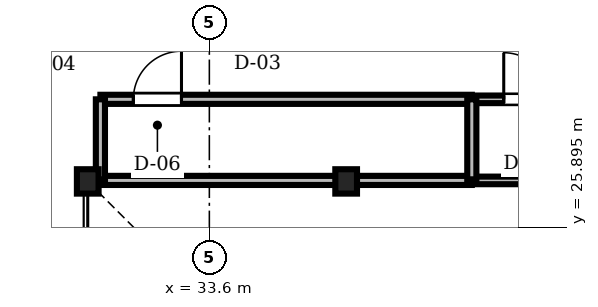
"""IFC4 building model, lengths in metres.
Left out: names, types, materials, properties, quantities, classifications, styles, units other than length and angle.
Written with IfcOpenShell. Run it as: python <this file> out.ifc"""

import sys

from ifc_helpers import new_model, si_unit, direction, frame, frame_2d, origin, origin_2d, place, context, subcontext, project, spatial, rectangle, i_section, extrude, source, transform, mapped, element, fill, save


model = new_model("IFC4")
c1 = context("Model", 3, precision=1e-05, world=origin(), true_north=direction((0.0, 1.0)))
c2 = subcontext(c1, "Body", "Model", "MODEL_VIEW")
j1 = project(units=[si_unit("LENGTHUNIT", "METRE"), si_unit("PLANEANGLEUNIT", "RADIAN")], contexts=[c1])
p1 = place(None, origin())
s1 = spatial("IfcSite", under=j1, at=p1, CompositionType="ELEMENT")
p2 = place(p1, origin())
s2 = spatial("IfcBuilding", under=s1, at=p2, CompositionType="ELEMENT")
p3 = place(p2, frame((0.0, 0.0, 60.45)))
s3 = spatial("IfcBuildingStorey", under=s2, at=p3, CompositionType="ELEMENT", Elevation=60.45)
m1 = source(origin(), c2, "Body", "SweptSolid", [
    extrude(i_section(OverallWidth=0.428, OverallDepth=0.481, WebThickness=0.04, FlangeThickness=0.063, FilletRadius=0.015, at=origin_2d()), origin(), (0.0, 0.0, 1.0), 3.41),
])
for number, where, z_axis, x_axis in (
    (1, (36.3, 26.8, 0.0), (0.0, 0.0, 1.0), (1.0, 0.0, 0.0)),
    (2, (31.2, 26.8, 0.0), (0.0, 0.0, 1.0), (1.0, 0.0, 0.0)),
):
    element("IfcColumn", number, at=place(p3, frame(where, z_axis=z_axis, x_axis=x_axis)), inside=s3, PredefinedType="COLUMN", context=c2, shape_type="MappedRepresentation", body=[
        mapped(m1, transform((0.0, 0.0, 0.0), scale=1.0)),
    ])
m2 = source(origin(), c2, "Body", "SweptSolid", [
    extrude(rectangle(XDim=7.33, YDim=0.18, at=frame_2d((3.665, 0.0))), origin(), (0.0, 0.0, 1.0), 3.042),
])
p4 = place(p3, frame((31.45, 28.42, 0.0), z_axis=(0.0, 0.0, 1.0), x_axis=(1.0, 0.0, 0.0)))
e3 = element("IfcWall", 3, at=p4, inside=s3, PredefinedType="PARTITIONING", context=c2, shape_type="MappedRepresentation", body=[
    mapped(m2, transform((0.0, 0.0, 0.0), scale=1.0)),
])
m3 = source(origin(), c2, "Body", "SweptSolid", [
    extrude(rectangle(XDim=0.95, YDim=2.15, at=frame_2d((0.475, 1.075))), frame((0.0, 0.1, 0.0), z_axis=(0.0, -1.0, 0.0), x_axis=(1.0, 0.0, 0.0)), (0.0, 0.0, 1.0), 0.2),
])
p5 = place(p4, frame((0.65, 0.0, 0.0)))
e4 = element("IfcOpeningElement", 4, at=p5, cuts=e3, PredefinedType="OPENING", context=c2, shape_type="MappedRepresentation", body=[
    mapped(m3, transform((0.0, 0.0, 0.0), scale=1.0)),
])
m4 = source(origin(), c2, "Body", "SweptSolid", [
    extrude(rectangle(XDim=2.74, YDim=0.15, at=frame_2d((1.37, 0.0))), origin(), (0.0, 0.0, 1.0), 3.41),
])
p6 = place(p3, frame((38.78, 28.42, 0.0), z_axis=(0.0, 0.0, 1.0), x_axis=(1.0, 0.0, 0.0)))
e5 = element("IfcWall", 5, at=p6, inside=s3, PredefinedType="PARTITIONING", context=c2, shape_type="MappedRepresentation", body=[
    mapped(m4, transform((0.0, 0.0, 0.0), scale=1.0)),
])
m5 = source(origin(), c2, "Body", "SweptSolid", [
    extrude(rectangle(XDim=0.92, YDim=2.1, at=frame_2d((0.46, 1.05))), frame((0.0, 0.085, 0.0), z_axis=(0.0, -1.0, 0.0), x_axis=(1.0, 0.0, 0.0)), (0.0, 0.0, 1.0), 0.17),
])
p7 = place(p6, frame((0.63, 0.0, 0.0)))
e6 = element("IfcOpeningElement", 6, at=p7, cuts=e5, PredefinedType="OPENING", context=c2, shape_type="MappedRepresentation", body=[
    mapped(m5, transform((0.0, 0.0, 0.0), scale=1.0)),
])
m6 = source(origin(), c2, "Body", "SweptSolid", [
    extrude(rectangle(XDim=7.33, YDim=0.18, at=frame_2d((3.665, 0.0))), origin(), (0.0, 0.0, 1.0), 2.952),
])
p8 = place(p3, frame((31.45, 26.82, 0.0), z_axis=(0.0, 0.0, 1.0), x_axis=(1.0, 0.0, 0.0)))
e7 = element("IfcWall", 7, at=p8, inside=s3, PredefinedType="PARTITIONING", context=c2, shape_type="MappedRepresentation", body=[
    mapped(m6, transform((0.0, 0.0, 0.0), scale=1.0)),
])
m7 = source(origin(), c2, "Body", "SweptSolid", [
    extrude(rectangle(XDim=2.74, YDim=0.15, at=frame_2d((1.37, 0.0))), origin(), (0.0, 0.0, 1.0), 2.802),
])
p9 = place(p3, frame((38.78, 26.82, 0.0), z_axis=(0.0, 0.0, 1.0), x_axis=(1.0, 0.0, 0.0)))
e8 = element("IfcWall", 8, at=p9, inside=s3, PredefinedType="PARTITIONING", context=c2, shape_type="MappedRepresentation", body=[
    mapped(m7, transform((0.0, 0.0, 0.0), scale=1.0)),
])
m8 = source(origin(), c2, "Body", "SweptSolid", [
    extrude(rectangle(XDim=1.6, YDim=0.18, at=frame_2d((0.8, 0.0))), origin(), (0.0, 0.0, 1.0), 2.952),
])
for number, where, z_axis, x_axis in (
    (9, (31.45, 26.82, 0.0), (0.0, 0.0, 1.0), (0.0, 1.0, 0.0)),
    (10, (38.78, 26.82, 0.0), (0.0, 0.0, 1.0), (0.0, 1.0, 0.0)),
):
    element("IfcWall", number, at=place(p3, frame(where, z_axis=z_axis, x_axis=x_axis)), inside=s3, PredefinedType="PARTITIONING", context=c2, shape_type="MappedRepresentation", body=[
        mapped(m8, transform((0.0, 0.0, 0.0), scale=1.0)),
    ])
m9 = source(origin(), c2, "Body", "SweptSolid", [
    extrude(rectangle(XDim=0.95, YDim=2.15, at=frame_2d((0.475, 1.075))), frame((0.0, 0.025, 0.0), z_axis=(0.0, -1.0, 0.0), x_axis=(1.0, 0.0, 0.0)), (0.0, 0.0, 1.0), 0.05),
])
p10 = place(p5, origin())
e11 = element("IfcDoor", 11, at=p10, inside=s3, OperationType="SINGLE_SWING_RIGHT", PredefinedType="DOOR", context=c2, shape_type="MappedRepresentation", body=[
    mapped(m9, transform((0.0, 0.0, 0.0), scale=1.0)),
])
fill(e4, e11)
m10 = source(origin(), c2, "Body", "SweptSolid", [
    extrude(rectangle(XDim=0.92, YDim=2.1, at=frame_2d((0.46, 1.05))), frame((0.0, 0.025, 0.0), z_axis=(0.0, -1.0, 0.0), x_axis=(1.0, 0.0, 0.0)), (0.0, 0.0, 1.0), 0.05),
])
p11 = place(p7, origin())
e12 = element("IfcDoor", 12, at=p11, inside=s3, OperationType="SINGLE_SWING_LEFT", PredefinedType="DOOR", context=c2, shape_type="MappedRepresentation", body=[
    mapped(m10, transform((0.0, 0.0, 0.0), scale=1.0)),
])
fill(e6, e12)
save(model, sys.argv[1])
